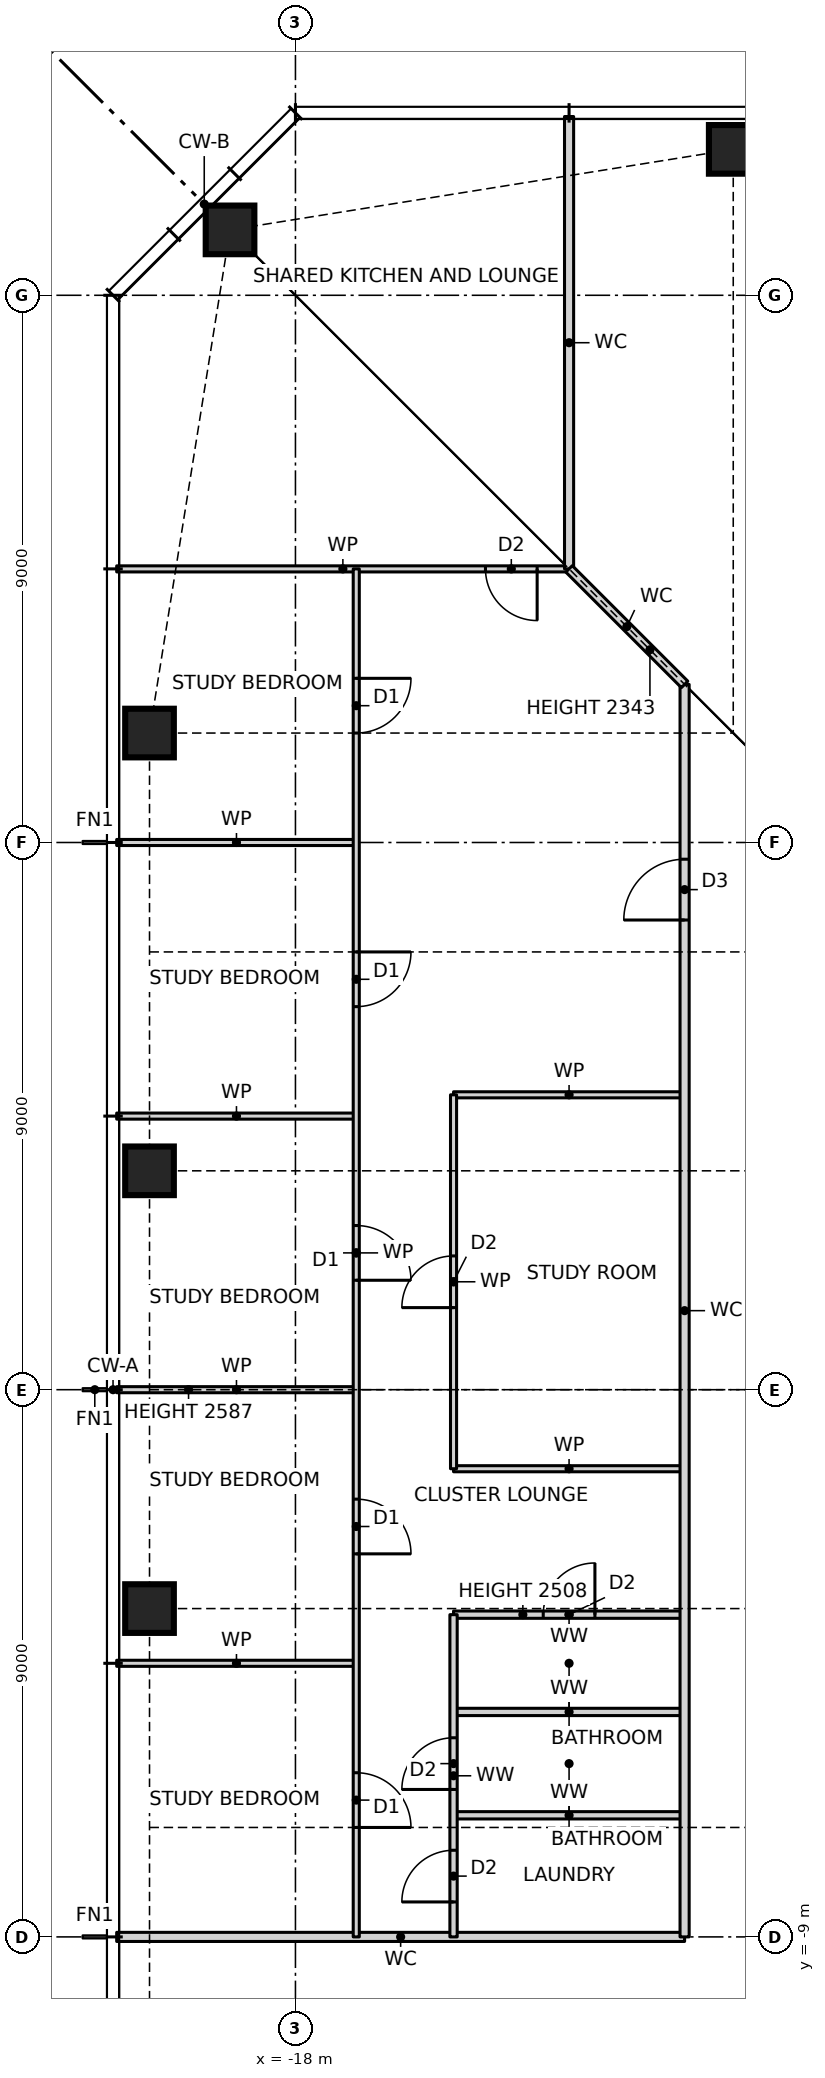
"""IFC4 building model, lengths in metres.
Left out: names, types, materials, properties, quantities, classifications, styles, units other than length and angle.
Written with IfcOpenShell. Run it as: python <this file> out.ifc"""

import sys

from ifc_helpers import new_model, si_unit, direction, frame, frame_2d, origin, origin_2d, place, context, subcontext, project, spatial, rectangle, hollow_rectangle, extrude, element, fill, save


model = new_model("IFC4")
c1 = context("Model", 3, precision=1e-05, world=origin(), true_north=direction((0.0, 1.0)))
c2 = subcontext(c1, "Body", "Model", "MODEL_VIEW")
j1 = project(units=[si_unit("LENGTHUNIT", "METRE"), si_unit("PLANEANGLEUNIT", "RADIAN")], contexts=[c1])
p1 = place(None, origin())
s1 = spatial("IfcSite", under=j1, at=p1, CompositionType="ELEMENT")
p2 = place(p1, origin())
s2 = spatial("IfcBuilding", under=s1, at=p2, CompositionType="ELEMENT")
p3 = place(p2, frame((0.0, 0.0, 101.5)))
s3 = spatial("IfcBuildingStorey", under=s2, at=p3, CompositionType="ELEMENT", Elevation=101.5)
for number, where, z_axis, x_axis in (
    (1, (-10.8, 20.4, 0.0), (0.0, 0.0, 1.0), (1.0, 0.0, 0.0)),
    (2, (-19.076, 19.076, 0.0), (0.0, 0.0, 1.0), (1.0, 0.0, 0.0)),
    (3, (-20.4, 10.8, 0.0), (0.0, 0.0, 1.0), (1.0, 0.0, 0.0)),
    (4, (-20.4, 3.6, 0.0), (0.0, 0.0, 1.0), (1.0, 0.0, 0.0)),
    (5, (-20.4, -3.6, 0.0), (0.0, 0.0, 1.0), (1.0, 0.0, 0.0)),
):
    element("IfcColumn", number, at=place(p3, frame(where, z_axis=z_axis, x_axis=x_axis)), inside=s3, PredefinedType="COLUMN", context=c2, shape_type="SweptSolid", body=[
        extrude(hollow_rectangle(XDim=0.8, YDim=0.8, WallThickness=0.07, at=origin_2d()), origin(), (0.0, 0.0, 1.0), 3.5),
    ])
p4 = place(p3, frame((-20.94, -9.0, 0.0), z_axis=(0.0, 0.0, 1.0), x_axis=(1.0, 0.0, 0.0)))
e6 = element("IfcWall", 6, at=p4, inside=s3, PredefinedType="PARTITIONING", context=c2, shape_type="SweptSolid", body=[
    extrude(rectangle(XDim=9.34, YDim=0.15, at=frame_2d((4.67, 0.0))), origin(), (0.0, 0.0, 1.0), 3.27),
])
for number, where, z_axis, x_axis in (
    (7, (-15.4, -7.0, 0.0), (0.0, 0.0, 1.0), (1.0, 0.0, 0.0)),
    (8, (-15.4, -5.3, 0.0), (0.0, 0.0, 1.0), (1.0, 0.0, 0.0)),
):
    element("IfcWall", number, at=place(p3, frame(where, z_axis=z_axis, x_axis=x_axis)), inside=s3, PredefinedType="PARTITIONING", context=c2, shape_type="SweptSolid", body=[
        extrude(rectangle(XDim=3.8, YDim=0.12, at=frame_2d((1.9, 0.0))), origin(), (0.0, 0.0, 1.0), 3.27),
    ])
p5 = place(p3, frame((-20.94, -4.5, 0.0), z_axis=(0.0, 0.0, 1.0), x_axis=(1.0, 0.0, 0.0)))
e9 = element("IfcWall", 9, at=p5, inside=s3, PredefinedType="PARTITIONING", context=c2, shape_type="SweptSolid", body=[
    extrude(rectangle(XDim=3.94, YDim=0.1, at=frame_2d((1.97, 0.0))), origin(), (0.0, 0.0, 1.0), 3.27),
])
p6 = place(p3, frame((-15.4, -3.7, 0.0), z_axis=(0.0, 0.0, 1.0), x_axis=(1.0, 0.0, 0.0)))
e10 = element("IfcWall", 10, at=p6, inside=s3, PredefinedType="PARTITIONING", context=c2, shape_type="SweptSolid", body=[
    extrude(rectangle(XDim=3.8, YDim=0.12, at=frame_2d((1.9, 0.0))), origin(), (0.0, 0.0, 1.0), 2.508),
])
p7 = place(p6, frame((1.475, 0.0, 0.0)))
e11 = element("IfcOpeningElement", 11, at=p7, cuts=e10, PredefinedType="OPENING", context=c2, shape_type="SweptSolid", body=[
    extrude(rectangle(XDim=0.85, YDim=2.1, at=frame_2d((0.425, 1.05))), frame((0.0, 0.07, 0.0), z_axis=(0.0, -1.0, 0.0), x_axis=(1.0, 0.0, 0.0)), (0.0, 0.0, 1.0), 0.14),
])
p8 = place(p3, frame((-15.4, -1.3, 0.0), z_axis=(0.0, 0.0, 1.0), x_axis=(1.0, 0.0, 0.0)))
e12 = element("IfcWall", 12, at=p8, inside=s3, PredefinedType="PARTITIONING", context=c2, shape_type="SweptSolid", body=[
    extrude(rectangle(XDim=3.8, YDim=0.1, at=frame_2d((1.9, 0.0))), origin(), (0.0, 0.0, 1.0), 3.27),
])
p9 = place(p3, frame((-20.94, 0.0, 0.0), z_axis=(0.0, 0.0, 1.0), x_axis=(1.0, 0.0, 0.0)))
e13 = element("IfcWall", 13, at=p9, inside=s3, PredefinedType="PARTITIONING", context=c2, shape_type="SweptSolid", body=[
    extrude(rectangle(XDim=3.94, YDim=0.1, at=frame_2d((1.97, 0.0))), origin(), (0.0, 0.0, 1.0), 2.587),
])
p10 = place(p3, frame((-20.94, 4.5, 0.0), z_axis=(0.0, 0.0, 1.0), x_axis=(1.0, 0.0, 0.0)))
e14 = element("IfcWall", 14, at=p10, inside=s3, PredefinedType="PARTITIONING", context=c2, shape_type="SweptSolid", body=[
    extrude(rectangle(XDim=3.94, YDim=0.1, at=frame_2d((1.97, 0.0))), origin(), (0.0, 0.0, 1.0), 3.27),
])
p11 = place(p3, frame((-15.4, 4.85, 0.0), z_axis=(0.0, 0.0, 1.0), x_axis=(1.0, 0.0, 0.0)))
e15 = element("IfcWall", 15, at=p11, inside=s3, PredefinedType="PARTITIONING", context=c2, shape_type="SweptSolid", body=[
    extrude(rectangle(XDim=3.8, YDim=0.1, at=frame_2d((1.9, 0.0))), origin(), (0.0, 0.0, 1.0), 3.27),
])
p12 = place(p3, frame((-20.94, 9.0, 0.0), z_axis=(0.0, 0.0, 1.0), x_axis=(1.0, 0.0, 0.0)))
e16 = element("IfcWall", 16, at=p12, inside=s3, PredefinedType="PARTITIONING", context=c2, shape_type="SweptSolid", body=[
    extrude(rectangle(XDim=3.94, YDim=0.1, at=frame_2d((1.97, 0.0))), origin(), (0.0, 0.0, 1.0), 3.27),
])
p13 = place(p3, frame((-20.94, 13.5, 0.0), z_axis=(0.0, 0.0, 1.0), x_axis=(1.0, 0.0, 0.0)))
e17 = element("IfcWall", 17, at=p13, inside=s3, PredefinedType="PARTITIONING", context=c2, shape_type="SweptSolid", body=[
    extrude(rectangle(XDim=7.44, YDim=0.1, at=frame_2d((3.72, 0.0))), origin(), (0.0, 0.0, 1.0), 3.27),
])
p14 = place(p13, frame((6.065, 0.0, 0.0)))
e18 = element("IfcOpeningElement", 18, at=p14, cuts=e17, PredefinedType="OPENING", context=c2, shape_type="SweptSolid", body=[
    extrude(rectangle(XDim=0.85, YDim=2.1, at=frame_2d((0.425, 1.05))), frame((0.0, 0.06, 0.0), z_axis=(0.0, -1.0, 0.0), x_axis=(1.0, 0.0, 0.0)), (0.0, 0.0, 1.0), 0.12),
])
p15 = place(p3, frame((-11.6, -9.0, 0.0), z_axis=(0.0, 0.0, 1.0), x_axis=(0.0, 1.0, 0.0)))
e19 = element("IfcWall", 19, at=p15, inside=s3, PredefinedType="PARTITIONING", context=c2, shape_type="SweptSolid", body=[
    extrude(rectangle(XDim=20.6, YDim=0.15, at=frame_2d((10.3, 0.0))), origin(), (0.0, 0.0, 1.0), 3.27),
])
p16 = place(p15, frame((16.725, 0.0, 0.0)))
e20 = element("IfcOpeningElement", 20, at=p16, cuts=e19, PredefinedType="OPENING", context=c2, shape_type="SweptSolid", body=[
    extrude(rectangle(XDim=1.0, YDim=2.1, at=frame_2d((0.5, 1.05))), frame((0.0, 0.085, 0.0), z_axis=(0.0, -1.0, 0.0), x_axis=(1.0, 0.0, 0.0)), (0.0, 0.0, 1.0), 0.17),
])
p17 = place(p3, frame((-13.5, 13.5, 0.0), z_axis=(0.0, 0.0, 1.0), x_axis=(0.0, 1.0, 0.0)))
e21 = element("IfcWall", 21, at=p17, inside=s3, PredefinedType="PARTITIONING", context=c2, shape_type="SweptSolid", body=[
    extrude(rectangle(XDim=7.44, YDim=0.15, at=frame_2d((3.72, 0.0))), origin(), (0.0, 0.0, 1.0), 3.27),
])
p18 = place(p3, frame((-15.4, -9.0, 0.0), z_axis=(0.0, 0.0, 1.0), x_axis=(0.0, 1.0, 0.0)))
e22 = element("IfcWall", 22, at=p18, inside=s3, PredefinedType="PARTITIONING", context=c2, shape_type="SweptSolid", body=[
    extrude(rectangle(XDim=5.3, YDim=0.12, at=frame_2d((2.65, 0.0))), origin(), (0.0, 0.0, 1.0), 3.27),
])
p19 = place(p18, frame((2.425, 0.0, 0.0)))
e23 = element("IfcOpeningElement", 23, at=p19, cuts=e22, PredefinedType="OPENING", context=c2, shape_type="SweptSolid", body=[
    extrude(rectangle(XDim=0.85, YDim=2.1, at=frame_2d((0.425, 1.05))), frame((0.0, 0.07, 0.0), z_axis=(0.0, -1.0, 0.0), x_axis=(1.0, 0.0, 0.0)), (0.0, 0.0, 1.0), 0.14),
])
p20 = place(p18, frame((0.575, 0.0, 0.0)))
e24 = element("IfcOpeningElement", 24, at=p20, cuts=e22, PredefinedType="OPENING", context=c2, shape_type="SweptSolid", body=[
    extrude(rectangle(XDim=0.85, YDim=2.1, at=frame_2d((0.425, 1.05))), frame((0.0, 0.07, 0.0), z_axis=(0.0, -1.0, 0.0), x_axis=(1.0, 0.0, 0.0)), (0.0, 0.0, 1.0), 0.14),
])
p21 = place(p3, frame((-15.4, -1.3, 0.0), z_axis=(0.0, 0.0, 1.0), x_axis=(0.0, 1.0, 0.0)))
e25 = element("IfcWall", 25, at=p21, inside=s3, PredefinedType="PARTITIONING", context=c2, shape_type="SweptSolid", body=[
    extrude(rectangle(XDim=6.15, YDim=0.1, at=frame_2d((3.075, 0.0))), origin(), (0.0, 0.0, 1.0), 3.27),
])
p22 = place(p21, frame((2.65, 0.0, 0.0)))
e26 = element("IfcOpeningElement", 26, at=p22, cuts=e25, PredefinedType="OPENING", context=c2, shape_type="SweptSolid", body=[
    extrude(rectangle(XDim=0.85, YDim=2.1, at=frame_2d((0.425, 1.05))), frame((0.0, 0.06, 0.0), z_axis=(0.0, -1.0, 0.0), x_axis=(1.0, 0.0, 0.0)), (0.0, 0.0, 1.0), 0.12),
])
p23 = place(p3, frame((-17.0, -9.0, 0.0), z_axis=(0.0, 0.0, 1.0), x_axis=(0.0, 1.0, 0.0)))
e27 = element("IfcWall", 27, at=p23, inside=s3, PredefinedType="PARTITIONING", context=c2, shape_type="SweptSolid", body=[
    extrude(rectangle(XDim=22.5, YDim=0.1, at=frame_2d((11.25, 0.0))), origin(), (0.0, 0.0, 1.0), 3.27),
])
p24 = place(p23, frame((19.8, 0.0, 0.0)))
e28 = element("IfcOpeningElement", 28, at=p24, cuts=e27, PredefinedType="OPENING", context=c2, shape_type="SweptSolid", body=[
    extrude(rectangle(XDim=0.9, YDim=2.1, at=frame_2d((0.45, 1.05))), frame((0.0, 0.06, 0.0), z_axis=(0.0, -1.0, 0.0), x_axis=(1.0, 0.0, 0.0)), (0.0, 0.0, 1.0), 0.12),
])
p25 = place(p23, frame((15.3, 0.0, 0.0)))
e29 = element("IfcOpeningElement", 29, at=p25, cuts=e27, PredefinedType="OPENING", context=c2, shape_type="SweptSolid", body=[
    extrude(rectangle(XDim=0.9, YDim=2.1, at=frame_2d((0.45, 1.05))), frame((0.0, 0.06, 0.0), z_axis=(0.0, -1.0, 0.0), x_axis=(1.0, 0.0, 0.0)), (0.0, 0.0, 1.0), 0.12),
])
p26 = place(p23, frame((10.8, 0.0, 0.0)))
e30 = element("IfcOpeningElement", 30, at=p26, cuts=e27, PredefinedType="OPENING", context=c2, shape_type="SweptSolid", body=[
    extrude(rectangle(XDim=0.9, YDim=2.1, at=frame_2d((0.45, 1.05))), frame((0.0, 0.06, 0.0), z_axis=(0.0, -1.0, 0.0), x_axis=(1.0, 0.0, 0.0)), (0.0, 0.0, 1.0), 0.12),
])
p27 = place(p23, frame((6.3, 0.0, 0.0)))
e31 = element("IfcOpeningElement", 31, at=p27, cuts=e27, PredefinedType="OPENING", context=c2, shape_type="SweptSolid", body=[
    extrude(rectangle(XDim=0.9, YDim=2.1, at=frame_2d((0.45, 1.05))), frame((0.0, 0.06, 0.0), z_axis=(0.0, -1.0, 0.0), x_axis=(1.0, 0.0, 0.0)), (0.0, 0.0, 1.0), 0.12),
])
p28 = place(p23, frame((1.8, 0.0, 0.0)))
e32 = element("IfcOpeningElement", 32, at=p28, cuts=e27, PredefinedType="OPENING", context=c2, shape_type="SweptSolid", body=[
    extrude(rectangle(XDim=0.9, YDim=2.1, at=frame_2d((0.45, 1.05))), frame((0.0, 0.06, 0.0), z_axis=(0.0, -1.0, 0.0), x_axis=(1.0, 0.0, 0.0)), (0.0, 0.0, 1.0), 0.12),
])
p29 = place(p3, frame((-11.6, 11.6, 0.0), z_axis=(0.0, 0.0, 1.0), x_axis=(-0.707106781187, 0.707106781187, 0.0)))
e33 = element("IfcWall", 33, at=p29, inside=s3, PredefinedType="PARTITIONING", context=c2, shape_type="SweptSolid", body=[
    extrude(rectangle(XDim=2.687, YDim=0.15, at=frame_2d((1.343, 0.0))), origin(), (0.0, 0.0, 1.0), 2.343),
])
p30 = place(p24, frame((0.9, 0.0, 0.0), z_axis=(0.0, 0.0, 1.0), x_axis=(-1.0, 0.0, 0.0)))
e34 = element("IfcDoor", 34, at=p30, inside=s3, OperationType="SINGLE_SWING_LEFT", PredefinedType="DOOR", context=c2, shape_type="SweptSolid", body=[
    extrude(rectangle(XDim=0.9, YDim=2.1, at=frame_2d((0.45, 1.05))), frame((0.0, 0.025, 0.0), z_axis=(0.0, -1.0, 0.0), x_axis=(1.0, 0.0, 0.0)), (0.0, 0.0, 1.0), 0.05),
])
fill(e28, e34)
p31 = place(p25, frame((0.9, 0.0, 0.0), z_axis=(0.0, 0.0, 1.0), x_axis=(-1.0, 0.0, 0.0)))
e35 = element("IfcDoor", 35, at=p31, inside=s3, OperationType="SINGLE_SWING_LEFT", PredefinedType="DOOR", context=c2, shape_type="SweptSolid", body=[
    extrude(rectangle(XDim=0.9, YDim=2.1, at=frame_2d((0.45, 1.05))), frame((0.0, 0.025, 0.0), z_axis=(0.0, -1.0, 0.0), x_axis=(1.0, 0.0, 0.0)), (0.0, 0.0, 1.0), 0.05),
])
fill(e29, e35)
p32 = place(p26, frame((0.9, 0.0, 0.0), z_axis=(0.0, 0.0, 1.0), x_axis=(-1.0, 0.0, 0.0)))
e36 = element("IfcDoor", 36, at=p32, inside=s3, OperationType="SINGLE_SWING_RIGHT", PredefinedType="DOOR", context=c2, shape_type="SweptSolid", body=[
    extrude(rectangle(XDim=0.9, YDim=2.1, at=frame_2d((0.45, 1.05))), frame((0.0, 0.025, 0.0), z_axis=(0.0, -1.0, 0.0), x_axis=(1.0, 0.0, 0.0)), (0.0, 0.0, 1.0), 0.05),
])
fill(e30, e36)
p33 = place(p27, frame((0.9, 0.0, 0.0), z_axis=(0.0, 0.0, 1.0), x_axis=(-1.0, 0.0, 0.0)))
e37 = element("IfcDoor", 37, at=p33, inside=s3, OperationType="SINGLE_SWING_RIGHT", PredefinedType="DOOR", context=c2, shape_type="SweptSolid", body=[
    extrude(rectangle(XDim=0.9, YDim=2.1, at=frame_2d((0.45, 1.05))), frame((0.0, 0.025, 0.0), z_axis=(0.0, -1.0, 0.0), x_axis=(1.0, 0.0, 0.0)), (0.0, 0.0, 1.0), 0.05),
])
fill(e31, e37)
p34 = place(p28, frame((0.9, 0.0, 0.0), z_axis=(0.0, 0.0, 1.0), x_axis=(-1.0, 0.0, 0.0)))
e38 = element("IfcDoor", 38, at=p34, inside=s3, OperationType="SINGLE_SWING_RIGHT", PredefinedType="DOOR", context=c2, shape_type="SweptSolid", body=[
    extrude(rectangle(XDim=0.9, YDim=2.1, at=frame_2d((0.45, 1.05))), frame((0.0, 0.025, 0.0), z_axis=(0.0, -1.0, 0.0), x_axis=(1.0, 0.0, 0.0)), (0.0, 0.0, 1.0), 0.05),
])
fill(e32, e38)
p35 = place(p16, origin())
e39 = element("IfcDoor", 39, at=p35, inside=s3, OperationType="SINGLE_SWING_LEFT", PredefinedType="DOOR", context=c2, shape_type="SweptSolid", body=[
    extrude(rectangle(XDim=1.0, YDim=2.1, at=frame_2d((0.5, 1.05))), frame((0.0, 0.025, 0.0), z_axis=(0.0, -1.0, 0.0), x_axis=(1.0, 0.0, 0.0)), (0.0, 0.0, 1.0), 0.05),
])
fill(e20, e39)
p36 = place(p22, origin())
e40 = element("IfcDoor", 40, at=p36, inside=s3, OperationType="SINGLE_SWING_LEFT", PredefinedType="DOOR", context=c2, shape_type="SweptSolid", body=[
    extrude(rectangle(XDim=0.85, YDim=2.1, at=frame_2d((0.425, 1.05))), frame((0.0, 0.025, 0.0), z_axis=(0.0, -1.0, 0.0), x_axis=(1.0, 0.0, 0.0)), (0.0, 0.0, 1.0), 0.05),
])
fill(e26, e40)
p37 = place(p7, origin())
e41 = element("IfcDoor", 41, at=p37, inside=s3, OperationType="SINGLE_SWING_RIGHT", PredefinedType="DOOR", context=c2, shape_type="SweptSolid", body=[
    extrude(rectangle(XDim=0.85, YDim=2.1, at=frame_2d((0.425, 1.05))), frame((0.0, 0.025, 0.0), z_axis=(0.0, -1.0, 0.0), x_axis=(1.0, 0.0, 0.0)), (0.0, 0.0, 1.0), 0.05),
])
fill(e11, e41)
p38 = place(p19, origin())
e42 = element("IfcDoor", 42, at=p38, inside=s3, OperationType="SINGLE_SWING_LEFT", PredefinedType="DOOR", context=c2, shape_type="SweptSolid", body=[
    extrude(rectangle(XDim=0.85, YDim=2.1, at=frame_2d((0.425, 1.05))), frame((0.0, 0.025, 0.0), z_axis=(0.0, -1.0, 0.0), x_axis=(1.0, 0.0, 0.0)), (0.0, 0.0, 1.0), 0.05),
])
fill(e23, e42)
p39 = place(p20, origin())
e43 = element("IfcDoor", 43, at=p39, inside=s3, OperationType="SINGLE_SWING_LEFT", PredefinedType="DOOR", context=c2, shape_type="SweptSolid", body=[
    extrude(rectangle(XDim=0.85, YDim=2.1, at=frame_2d((0.425, 1.05))), frame((0.0, 0.025, 0.0), z_axis=(0.0, -1.0, 0.0), x_axis=(1.0, 0.0, 0.0)), (0.0, 0.0, 1.0), 0.05),
])
fill(e24, e43)
p40 = place(p14, frame((0.85, 0.0, 0.0), z_axis=(0.0, 0.0, 1.0), x_axis=(-1.0, 0.0, 0.0)))
e44 = element("IfcDoor", 44, at=p40, inside=s3, OperationType="SINGLE_SWING_LEFT", PredefinedType="DOOR", context=c2, shape_type="SweptSolid", body=[
    extrude(rectangle(XDim=0.85, YDim=2.1, at=frame_2d((0.425, 1.05))), frame((0.0, 0.025, 0.0), z_axis=(0.0, -1.0, 0.0), x_axis=(1.0, 0.0, 0.0)), (0.0, 0.0, 1.0), 0.05),
])
fill(e18, e44)
save(model, sys.argv[1])
